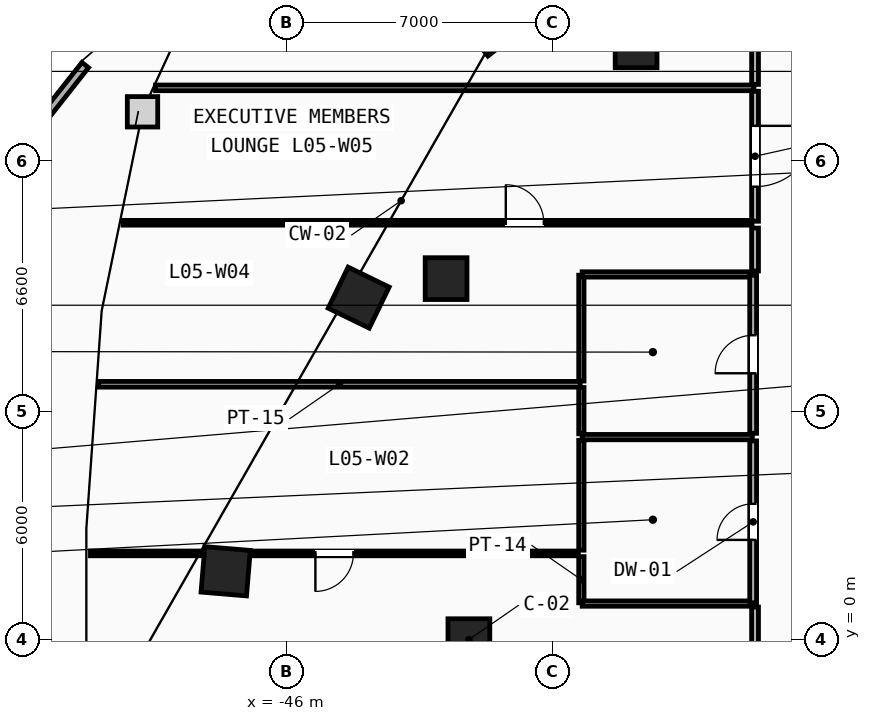
"""IFC4 building model, lengths in metres.
Left out: names, types, materials, properties, quantities, classifications, styles, units other than length and angle.
Written with IfcOpenShell. Run it as: python <this file> out.ifc"""

import sys

from ifc_helpers import new_model, si_unit, direction, frame, frame_2d, origin, origin_2d, place, context, subcontext, project, spatial, rectangle, extrude, element, fill, save


model = new_model("IFC4")
c1 = context("Model", 3, precision=1e-05, world=origin(), true_north=direction((0.0, 1.0)))
c2 = subcontext(c1, "Body", "Model", "MODEL_VIEW")
j1 = project(units=[si_unit("LENGTHUNIT", "METRE"), si_unit("PLANEANGLEUNIT", "RADIAN")], contexts=[c1])
p1 = place(None, origin())
s1 = spatial("IfcSite", under=j1, at=p1, CompositionType="ELEMENT")
p2 = place(p1, origin())
s2 = spatial("IfcBuilding", under=s1, at=p2, CompositionType="ELEMENT")
p3 = place(p2, frame((0.0, 0.0, 24.0)))
s3 = spatial("IfcBuildingStorey", under=s2, at=p3, CompositionType="ELEMENT", Elevation=24.0)
for number, where, z_axis, x_axis in (
    (1, (-41.2, 0.0, 0.0), (0.0, 0.0, 1.0), (1.0, 0.0, 0.0)),
    (2, (-41.8, 9.5, 0.0), (0.0, 0.0, 1.0), (1.0, 0.0, 0.0)),
    (3, (-36.8, 15.6, 0.0), (0.0, 0.0, 1.0), (1.0, 0.0, 0.0)),
):
    element("IfcColumn", number, at=place(p3, frame(where, z_axis=z_axis, x_axis=x_axis)), inside=s3, PredefinedType="COLUMN", context=c2, shape_type="SweptSolid", body=[
        extrude(rectangle(XDim=1.1, YDim=1.1, at=origin_2d()), origin(), (0.0, 0.0, 1.0), 3.8),
    ])
for number, where, z_axis, x_axis in (
    (4, (-40.6, 16.2, 0.0), (0.0, 0.0, 1.0), (-0.785, -0.619, 0.0)),
    (5, (-44.1, 9.0, 0.0), (0.0, 0.0, 1.0), (-0.437, -0.899, 0.0)),
    (6, (-47.6, 1.8, 0.0), (0.0, 0.0, 1.0), (-0.084, -0.997, 0.0)),
):
    element("IfcColumn", number, at=place(p3, frame(where, z_axis=z_axis, x_axis=x_axis)), inside=s3, PredefinedType="COLUMN", context=c2, shape_type="SweptSolid", body=[
        extrude(rectangle(XDim=1.2, YDim=1.2, at=origin_2d()), origin(), (0.0, 0.0, 1.0), 3.8),
    ])
p4 = place(p3, frame((-54.249, 11.377, 0.0), z_axis=(0.0, 0.0, 1.0), x_axis=(0.619435057485, 0.785047902716, 0.0)))
e7 = element("IfcWall", 7, at=p4, inside=s3, PredefinedType="PARAPET", context=c2, shape_type="SweptSolid", body=[
    extrude(rectangle(XDim=4.767, YDim=0.22, at=frame_2d((2.384, 0.0))), origin(), (0.0, 0.0, 1.0), 1.15),
])
p5 = place(p3, frame((-38.24, 0.97, 0.0), z_axis=(0.0, 0.0, 1.0), x_axis=(0.0, 1.0, 0.0)))
e8 = element("IfcWall", 8, at=p5, inside=s3, PredefinedType="PARTITIONING", context=c2, shape_type="SweptSolid", body=[
    extrude(rectangle(XDim=1.215, YDim=0.14, at=frame_2d((0.607, 0.0))), origin(), (0.0, 0.0, 1.0), 3.5),
])
p6 = place(p3, frame((-38.24, 2.355, 0.0), z_axis=(0.0, 0.0, 1.0), x_axis=(0.0, 1.0, 0.0)))
e9 = element("IfcWall", 9, at=p6, inside=s3, PredefinedType="PARTITIONING", context=c2, shape_type="SweptSolid", body=[
    extrude(rectangle(XDim=2.89, YDim=0.14, at=frame_2d((1.445, 0.0))), origin(), (0.0, 0.0, 1.0), 3.5),
])
p7 = place(p3, frame((-38.24, 5.415, 0.0), z_axis=(0.0, 0.0, 1.0), x_axis=(0.0, 1.0, 0.0)))
e10 = element("IfcWall", 10, at=p7, inside=s3, PredefinedType="PARTITIONING", context=c2, shape_type="SweptSolid", body=[
    extrude(rectangle(XDim=1.22, YDim=0.14, at=frame_2d((0.61, 0.0))), origin(), (0.0, 0.0, 1.0), 3.5),
])
p8 = place(p3, frame((-38.24, 6.805, 0.0), z_axis=(0.0, 0.0, 1.0), x_axis=(0.0, 1.0, 0.0)))
e11 = element("IfcWall", 11, at=p8, inside=s3, PredefinedType="PARTITIONING", context=c2, shape_type="SweptSolid", body=[
    extrude(rectangle(XDim=2.785, YDim=0.14, at=frame_2d((1.393, 0.0))), origin(), (0.0, 0.0, 1.0), 3.5),
])
for number, where, z_axis, x_axis in (
    (12, (-38.22, 0.95, 0.0), (0.0, 0.0, 1.0), (1.0, 0.0, 0.0)),
    (13, (-38.22, 5.33, 0.0), (0.0, 0.0, 1.0), (1.0, 0.0, 0.0)),
    (14, (-38.22, 9.61, 0.0), (0.0, 0.0, 1.0), (1.0, 0.0, 0.0)),
):
    element("IfcWall", number, at=place(p3, frame(where, z_axis=z_axis, x_axis=x_axis)), inside=s3, PredefinedType="PARTITIONING", context=c2, shape_type="SweptSolid", body=[
        extrude(rectangle(XDim=4.48, YDim=0.14, at=frame_2d((2.24, 0.0))), origin(), (0.0, 0.0, 1.0), 3.5),
    ])
p9 = place(p3, frame((-33.72, 0.97, 0.0), z_axis=(0.0, 0.0, 1.0), x_axis=(0.0, 1.0, 0.0)))
e15 = element("IfcWall", 15, at=p9, inside=s3, PredefinedType="PARTITIONING", context=c2, shape_type="SweptSolid", body=[
    extrude(rectangle(XDim=4.26, YDim=0.18, at=frame_2d((2.13, 0.0))), origin(), (0.0, 0.0, 1.0), 3.5),
])
p10 = place(p9, frame((1.655, 0.0, 0.0)))
e16 = element("IfcOpeningElement", 16, at=p10, cuts=e15, PredefinedType="OPENING", context=c2, shape_type="SweptSolid", body=[
    extrude(rectangle(XDim=0.95, YDim=2.1, at=frame_2d((0.475, 1.05))), frame((0.0, 0.1, 0.0), z_axis=(0.0, -1.0, 0.0), x_axis=(1.0, 0.0, 0.0)), (0.0, 0.0, 1.0), 0.2),
])
p11 = place(p3, frame((-33.72, 5.43, 0.0), z_axis=(0.0, 0.0, 1.0), x_axis=(0.0, 1.0, 0.0)))
e17 = element("IfcWall", 17, at=p11, inside=s3, PredefinedType="PARTITIONING", context=c2, shape_type="SweptSolid", body=[
    extrude(rectangle(XDim=4.16, YDim=0.18, at=frame_2d((2.08, 0.0))), origin(), (0.0, 0.0, 1.0), 3.5),
])
p12 = place(p11, frame((1.58, 0.0, 0.0)))
e18 = element("IfcOpeningElement", 18, at=p12, cuts=e17, PredefinedType="OPENING", context=c2, shape_type="SweptSolid", body=[
    extrude(rectangle(XDim=1.0, YDim=2.15, at=frame_2d((0.5, 1.075))), frame((0.0, 0.1, 0.0), z_axis=(0.0, -1.0, 0.0), x_axis=(1.0, 0.0, 0.0)), (0.0, 0.0, 1.0), 0.2),
])
p13 = place(p3, frame((-50.941, 6.72, 0.0), z_axis=(0.0, 0.0, 1.0), x_axis=(1.0, 0.0, 0.0)))
e19 = element("IfcWall", 19, at=p13, inside=s3, PredefinedType="PARTITIONING", context=c2, shape_type="SweptSolid", body=[
    extrude(rectangle(XDim=12.671, YDim=0.15, at=frame_2d((6.335, 0.0))), origin(), (0.0, 0.0, 1.0), 3.5),
])
p14 = place(p3, frame((-49.445, 14.52, 0.0), z_axis=(0.0, 0.0, 1.0), x_axis=(1.0, 0.0, 0.0)))
e20 = element("IfcWall", 20, at=p14, inside=s3, PredefinedType="PARTITIONING", context=c2, shape_type="SweptSolid", body=[
    extrude(rectangle(XDim=15.745, YDim=0.15, at=frame_2d((7.873, 0.0))), origin(), (0.0, 0.0, 1.0), 3.5),
])
p15 = place(p3, frame((-33.67, 0.859, 0.0), z_axis=(0.0, 0.0, 1.0), x_axis=(0.0, -1.0, 0.0)))
e21 = element("IfcWall", 21, at=p15, inside=s3, PredefinedType="PARTITIONING", context=c2, shape_type="SweptSolid", body=[
    extrude(rectangle(XDim=12.259, YDim=0.18, at=frame_2d((6.129, 0.0))), origin(), (0.0, 0.0, 1.0), 3.5),
])
p16 = place(p3, frame((-33.67, 17.428, 0.0), z_axis=(0.0, 0.0, 1.0), x_axis=(0.0, -1.0, 0.0)))
e22 = element("IfcWall", 22, at=p16, inside=s3, PredefinedType="PARTITIONING", context=c2, shape_type="SweptSolid", body=[
    extrude(rectangle(XDim=2.818, YDim=0.18, at=frame_2d((1.409, 0.0))), origin(), (0.0, 0.0, 1.0), 3.5),
])
p17 = place(p3, frame((-33.67, 10.83, 0.0), z_axis=(0.0, 0.0, 1.0), x_axis=(0.0, -1.0, 0.0)))
e23 = element("IfcWall", 23, at=p17, inside=s3, PredefinedType="PARTITIONING", context=c2, shape_type="SweptSolid", body=[
    extrude(rectangle(XDim=1.129, YDim=0.18, at=frame_2d((0.564, 0.0))), origin(), (0.0, 0.0, 1.0), 3.5),
])
p18 = place(p3, frame((-33.67, 14.43, 0.0), z_axis=(0.0, 0.0, 1.0), x_axis=(0.0, -1.0, 0.0)))
e24 = element("IfcWall", 24, at=p18, inside=s3, PredefinedType="PARTITIONING", context=c2, shape_type="SweptSolid", body=[
    extrude(rectangle(XDim=3.42, YDim=0.18, at=frame_2d((1.71, 0.0))), origin(), (0.0, 0.0, 1.0), 3.5),
])
p19 = place(p18, frame((0.91, 0.0, 0.0)))
e25 = element("IfcOpeningElement", 25, at=p19, cuts=e24, PredefinedType="OPENING", context=c2, shape_type="SweptSolid", body=[
    extrude(rectangle(XDim=1.6, YDim=2.2, at=frame_2d((0.8, 1.1))), frame((0.0, 0.1, 0.0), z_axis=(0.0, -1.0, 0.0), x_axis=(1.0, 0.0, 0.0)), (0.0, 0.0, 1.0), 0.2),
])
p20 = place(p3, frame((-38.32, 2.27, 0.0), z_axis=(0.0, 0.0, 1.0), x_axis=(-1.0, 0.0, 0.0)))
e26 = element("IfcWall", 26, at=p20, inside=s3, PredefinedType="PARTITIONING", context=c2, shape_type="SweptSolid", body=[
    extrude(rectangle(XDim=12.838, YDim=0.125, at=frame_2d((6.419, 0.0))), origin(), (0.0, 0.0, 1.0), 3.5),
])
p21 = place(p20, frame((5.919, 0.0, 0.0)))
e27 = element("IfcOpeningElement", 27, at=p21, cuts=e26, PredefinedType="OPENING", context=c2, shape_type="SweptSolid", body=[
    extrude(rectangle(XDim=1.0, YDim=2.15, at=frame_2d((0.5, 1.075))), frame((0.0, 0.073, 0.0), z_axis=(0.0, -1.0, 0.0), x_axis=(1.0, 0.0, 0.0)), (0.0, 0.0, 1.0), 0.145),
])
p22 = place(p3, frame((-50.302, 10.97, 0.0), z_axis=(0.0, 0.0, 1.0), x_axis=(1.0, 0.0, 0.0)))
e28 = element("IfcWall", 28, at=p22, inside=s3, PredefinedType="PARTITIONING", context=c2, shape_type="SweptSolid", body=[
    extrude(rectangle(XDim=16.552, YDim=0.125, at=frame_2d((8.276, 0.0))), origin(), (0.0, 0.0, 1.0), 3.5),
])
p23 = place(p22, frame((10.073, 0.0, 0.0)))
e29 = element("IfcOpeningElement", 29, at=p23, cuts=e28, PredefinedType="OPENING", context=c2, shape_type="SweptSolid", body=[
    extrude(rectangle(XDim=1.0, YDim=2.15, at=frame_2d((0.5, 1.075))), frame((0.0, 0.073, 0.0), z_axis=(0.0, -1.0, 0.0), x_axis=(1.0, 0.0, 0.0)), (0.0, 0.0, 1.0), 0.145),
])
p24 = place(p23, origin())
e30 = element("IfcDoor", 30, at=p24, inside=s3, OperationType="SINGLE_SWING_LEFT", PredefinedType="DOOR", context=c2, shape_type="SweptSolid", body=[
    extrude(rectangle(XDim=1.0, YDim=2.15, at=frame_2d((0.5, 1.075))), frame((0.0, 0.025, 0.0), z_axis=(0.0, -1.0, 0.0), x_axis=(1.0, 0.0, 0.0)), (0.0, 0.0, 1.0), 0.05),
])
fill(e29, e30)
p25 = place(p21, origin())
e31 = element("IfcDoor", 31, at=p25, inside=s3, OperationType="SINGLE_SWING_RIGHT", PredefinedType="DOOR", context=c2, shape_type="SweptSolid", body=[
    extrude(rectangle(XDim=1.0, YDim=2.15, at=frame_2d((0.5, 1.075))), frame((0.0, 0.025, 0.0), z_axis=(0.0, -1.0, 0.0), x_axis=(1.0, 0.0, 0.0)), (0.0, 0.0, 1.0), 0.05),
])
fill(e27, e31)
p26 = place(p10, origin())
e32 = element("IfcDoor", 32, at=p26, inside=s3, OperationType="SINGLE_SWING_LEFT", PredefinedType="DOOR", context=c2, shape_type="SweptSolid", body=[
    extrude(rectangle(XDim=0.95, YDim=2.1, at=frame_2d((0.475, 1.05))), frame((0.0, 0.025, 0.0), z_axis=(0.0, -1.0, 0.0), x_axis=(1.0, 0.0, 0.0)), (0.0, 0.0, 1.0), 0.05),
])
fill(e16, e32)
p27 = place(p12, origin())
e33 = element("IfcDoor", 33, at=p27, inside=s3, OperationType="SINGLE_SWING_LEFT", PredefinedType="DOOR", context=c2, shape_type="SweptSolid", body=[
    extrude(rectangle(XDim=1.0, YDim=2.15, at=frame_2d((0.5, 1.075))), frame((0.0, 0.025, 0.0), z_axis=(0.0, -1.0, 0.0), x_axis=(1.0, 0.0, 0.0)), (0.0, 0.0, 1.0), 0.05),
])
fill(e18, e33)
p28 = place(p19, origin())
e34 = element("IfcDoor", 34, at=p28, inside=s3, OperationType="SINGLE_SWING_LEFT", PredefinedType="DOOR", context=c2, shape_type="SweptSolid", body=[
    extrude(rectangle(XDim=1.6, YDim=2.2, at=frame_2d((0.8, 1.1))), frame((0.0, 0.025, 0.0), z_axis=(0.0, -1.0, 0.0), x_axis=(1.0, 0.0, 0.0)), (0.0, 0.0, 1.0), 0.05),
])
fill(e25, e34)
save(model, sys.argv[1])
